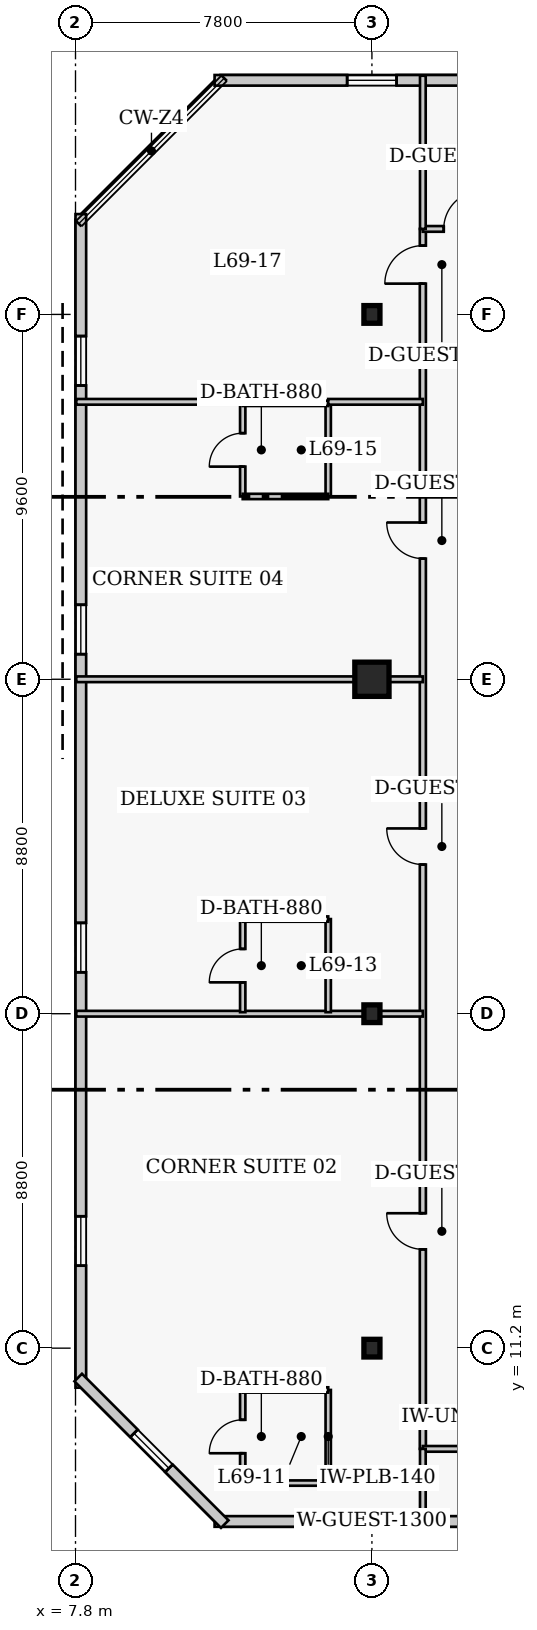
"""IFC4 building model, lengths in metres.
Left out: names, types, materials, properties, quantities, classifications, styles, units other than length and angle.
Written with IfcOpenShell. Run it as: python <this file> out.ifc"""

import sys

from ifc_helpers import new_model, si_unit, direction, frame, frame_2d, origin, origin_2d, place, context, subcontext, project, spatial, rectangle, i_section, extrude, element, fill, save


model = new_model("IFC4")
c1 = context("Model", 3, precision=1e-05, world=origin(), true_north=direction((0.0, 1.0)))
c2 = subcontext(c1, "Body", "Model", "MODEL_VIEW")
j1 = project(units=[si_unit("LENGTHUNIT", "METRE"), si_unit("PLANEANGLEUNIT", "RADIAN")], contexts=[c1])
p1 = place(None, origin())
s1 = spatial("IfcSite", under=j1, at=p1, CompositionType="ELEMENT")
p2 = place(p1, origin())
s2 = spatial("IfcBuilding", under=s1, at=p2, CompositionType="ELEMENT")
p3 = place(p2, frame((0.0, 0.0, 277.4)))
s3 = spatial("IfcBuildingStorey", under=s2, at=p3, CompositionType="ELEMENT", Elevation=277.4)
for number, where, z_axis, x_axis in (
    (1, (15.6, 11.2, 0.0), (0.0, 0.0, 1.0), (1.0, 0.0, 0.0)),
    (2, (15.6, 20.0, 0.0), (0.0, 0.0, 1.0), (1.0, 0.0, 0.0)),
):
    element("IfcColumn", number, at=place(p3, frame(where, z_axis=z_axis, x_axis=x_axis)), inside=s3, PredefinedType="COLUMN", context=c2, shape_type="SweptSolid", body=[
        extrude(i_section(OverallWidth=0.422, OverallDepth=0.465, WebThickness=0.045, FlangeThickness=0.073, FilletRadius=0.017, at=origin_2d()), origin(), (0.0, 0.0, 1.0), 4.0),
    ])
p4 = place(p3, frame((15.6, 28.8, 0.0), z_axis=(0.0, 0.0, 1.0), x_axis=(1.0, 0.0, 0.0)))
e3 = element("IfcColumn", 3, at=p4, inside=s3, PredefinedType="COLUMN", context=c2, shape_type="SweptSolid", body=[
    extrude(rectangle(XDim=0.9, YDim=0.9, at=origin_2d()), origin(), (0.0, 0.0, 1.0), 4.0),
])
p5 = place(p3, frame((15.6, 38.4, 0.0), z_axis=(0.0, 0.0, 1.0), x_axis=(1.0, 0.0, 0.0)))
e4 = element("IfcColumn", 4, at=p5, inside=s3, PredefinedType="COLUMN", context=c2, shape_type="SweptSolid", body=[
    extrude(i_section(OverallWidth=0.422, OverallDepth=0.465, WebThickness=0.045, FlangeThickness=0.073, FilletRadius=0.017, at=origin_2d()), origin(), (0.0, 0.0, 1.0), 4.0),
])
p6 = place(p3, frame((11.46, 6.64, 0.0), z_axis=(0.0, 0.0, 1.0), x_axis=(1.0, 0.0, 0.0)))
e5 = element("IfcWall", 5, at=p6, inside=s3, PredefinedType="SOLIDWALL", context=c2, shape_type="SweptSolid", body=[
    extrude(rectangle(XDim=24.83, YDim=0.28, at=frame_2d((12.415, 0.0))), origin(), (0.0, 0.0, 1.0), 3.76),
])
p7 = place(p6, frame((15.14, 0.0, 0.0)))
e6 = element("IfcOpeningElement", 6, at=p7, cuts=e5, PredefinedType="OPENING", context=c2, shape_type="SweptSolid", body=[
    extrude(rectangle(XDim=1.4, YDim=2.15, at=frame_2d((0.7, 1.075))), frame((0.0, 0.15, 0.0), z_axis=(0.0, -1.0, 0.0), x_axis=(1.0, 0.0, 0.0)), (0.0, 0.0, 1.0), 0.3),
])
p8 = place(p6, frame((3.488, 0.0, 0.85)))
e7 = element("IfcOpeningElement", 7, at=p8, cuts=e5, PredefinedType="OPENING", context=c2, shape_type="SweptSolid", body=[
    extrude(rectangle(XDim=1.3, YDim=1.7, at=frame_2d((0.65, 0.85))), frame((0.0, 0.15, 0.0), z_axis=(0.0, -1.0, 0.0), x_axis=(1.0, 0.0, 0.0)), (0.0, 0.0, 1.0), 0.3),
])
p9 = place(p6, frame((12.915, 0.0, 0.85)))
e8 = element("IfcOpeningElement", 8, at=p9, cuts=e5, PredefinedType="OPENING", context=c2, shape_type="SweptSolid", body=[
    extrude(rectangle(XDim=1.3, YDim=1.7, at=frame_2d((0.65, 0.85))), frame((0.0, 0.15, 0.0), z_axis=(0.0, -1.0, 0.0), x_axis=(1.0, 0.0, 0.0)), (0.0, 0.0, 1.0), 0.3),
])
p10 = place(p6, frame((20.692, 0.0, 0.85)))
e9 = element("IfcOpeningElement", 9, at=p10, cuts=e5, PredefinedType="OPENING", context=c2, shape_type="SweptSolid", body=[
    extrude(rectangle(XDim=1.3, YDim=1.7, at=frame_2d((0.65, 0.85))), frame((0.0, 0.15, 0.0), z_axis=(0.0, -1.0, 0.0), x_axis=(1.0, 0.0, 0.0)), (0.0, 0.0, 1.0), 0.3),
])
p11 = place(p3, frame((36.29, 44.56, 0.0), z_axis=(0.0, 0.0, 1.0), x_axis=(-1.0, 0.0, 0.0)))
e10 = element("IfcWall", 10, at=p11, inside=s3, PredefinedType="SOLIDWALL", context=c2, shape_type="SweptSolid", body=[
    extrude(rectangle(XDim=24.83, YDim=0.28, at=frame_2d((12.415, 0.0))), origin(), (0.0, 0.0, 1.0), 3.76),
])
p12 = place(p11, frame((3.488, 0.0, 0.85)))
e11 = element("IfcOpeningElement", 11, at=p12, cuts=e10, PredefinedType="OPENING", context=c2, shape_type="SweptSolid", body=[
    extrude(rectangle(XDim=1.3, YDim=1.7, at=frame_2d((0.65, 0.85))), frame((0.0, 0.15, 0.0), z_axis=(0.0, -1.0, 0.0), x_axis=(1.0, 0.0, 0.0)), (0.0, 0.0, 1.0), 0.3),
])
p13 = place(p11, frame((11.765, 0.0, 0.85)))
e12 = element("IfcOpeningElement", 12, at=p13, cuts=e10, PredefinedType="OPENING", context=c2, shape_type="SweptSolid", body=[
    extrude(rectangle(XDim=1.3, YDim=1.7, at=frame_2d((0.65, 0.85))), frame((0.0, 0.15, 0.0), z_axis=(0.0, -1.0, 0.0), x_axis=(1.0, 0.0, 0.0)), (0.0, 0.0, 1.0), 0.3),
])
p14 = place(p11, frame((20.042, 0.0, 0.85)))
e13 = element("IfcOpeningElement", 13, at=p14, cuts=e10, PredefinedType="OPENING", context=c2, shape_type="SweptSolid", body=[
    extrude(rectangle(XDim=1.3, YDim=1.7, at=frame_2d((0.65, 0.85))), frame((0.0, 0.15, 0.0), z_axis=(0.0, -1.0, 0.0), x_axis=(1.0, 0.0, 0.0)), (0.0, 0.0, 1.0), 0.3),
])
p15 = place(p3, frame((7.94, 41.04, 0.0), z_axis=(0.0, 0.0, 1.0), x_axis=(0.0, -1.0, 0.0)))
e14 = element("IfcWall", 14, at=p15, inside=s3, PredefinedType="SOLIDWALL", context=c2, shape_type="SweptSolid", body=[
    extrude(rectangle(XDim=30.88, YDim=0.28, at=frame_2d((15.44, 0.0))), origin(), (0.0, 0.0, 1.0), 3.76),
])
p16 = place(p15, frame((3.21, 0.0, 0.85)))
e15 = element("IfcOpeningElement", 15, at=p16, cuts=e14, PredefinedType="OPENING", context=c2, shape_type="SweptSolid", body=[
    extrude(rectangle(XDim=1.3, YDim=1.7, at=frame_2d((0.65, 0.85))), frame((0.0, 0.15, 0.0), z_axis=(0.0, -1.0, 0.0), x_axis=(1.0, 0.0, 0.0)), (0.0, 0.0, 1.0), 0.3),
])
p17 = place(p15, frame((10.28, 0.0, 0.85)))
e16 = element("IfcOpeningElement", 16, at=p17, cuts=e14, PredefinedType="OPENING", context=c2, shape_type="SweptSolid", body=[
    extrude(rectangle(XDim=1.3, YDim=1.7, at=frame_2d((0.65, 0.85))), frame((0.0, 0.15, 0.0), z_axis=(0.0, -1.0, 0.0), x_axis=(1.0, 0.0, 0.0)), (0.0, 0.0, 1.0), 0.3),
])
p18 = place(p15, frame((18.65, 0.0, 0.85)))
e17 = element("IfcOpeningElement", 17, at=p18, cuts=e14, PredefinedType="OPENING", context=c2, shape_type="SweptSolid", body=[
    extrude(rectangle(XDim=1.3, YDim=1.7, at=frame_2d((0.65, 0.85))), frame((0.0, 0.15, 0.0), z_axis=(0.0, -1.0, 0.0), x_axis=(1.0, 0.0, 0.0)), (0.0, 0.0, 1.0), 0.3),
])
p19 = place(p15, frame((26.37, 0.0, 0.85)))
e18 = element("IfcOpeningElement", 18, at=p19, cuts=e14, PredefinedType="OPENING", context=c2, shape_type="SweptSolid", body=[
    extrude(rectangle(XDim=1.3, YDim=1.7, at=frame_2d((0.65, 0.85))), frame((0.0, 0.15, 0.0), z_axis=(0.0, -1.0, 0.0), x_axis=(1.0, 0.0, 0.0)), (0.0, 0.0, 1.0), 0.3),
])
p20 = place(p3, frame((7.871, 10.427, 0.0), z_axis=(0.0, 0.0, 1.0), x_axis=(0.707129162587, -0.707084399077, 0.0)))
e19 = element("IfcWall", 19, at=p20, inside=s3, PredefinedType="SOLIDWALL", context=c2, shape_type="SweptSolid", body=[
    extrude(rectangle(XDim=5.454, YDim=0.28, at=frame_2d((2.727, 0.0))), origin(), (0.0, 0.0, 1.0), 3.76),
])
p21 = place(p20, frame((2.077, 0.0, 0.85)))
e20 = element("IfcOpeningElement", 20, at=p21, cuts=e19, PredefinedType="OPENING", context=c2, shape_type="SweptSolid", body=[
    extrude(rectangle(XDim=1.3, YDim=1.7, at=frame_2d((0.65, 0.85))), frame((0.0, 0.15, 0.0), z_axis=(0.0, -1.0, 0.0), x_axis=(1.0, 0.0, 0.0)), (0.0, 0.0, 1.0), 0.3),
])
p22 = place(p3, frame((16.94, 8.55, 0.0), z_axis=(0.0, 0.0, 1.0), x_axis=(0.0, 1.0, 0.0)))
e21 = element("IfcWall", 21, at=p22, inside=s3, PredefinedType="PARTITIONING", context=c2, shape_type="SweptSolid", body=[
    extrude(rectangle(XDim=32.1, YDim=0.16, at=frame_2d((16.05, 0.0))), origin(), (0.0, 0.0, 1.0), 3.76),
])
p23 = place(p22, frame((5.25, 0.0, 0.0)))
e22 = element("IfcOpeningElement", 22, at=p23, cuts=e21, PredefinedType="OPENING", context=c2, shape_type="SweptSolid", body=[
    extrude(rectangle(XDim=0.95, YDim=2.1, at=frame_2d((0.475, 1.05))), frame((0.0, 0.09, 0.0), z_axis=(0.0, -1.0, 0.0), x_axis=(1.0, 0.0, 0.0)), (0.0, 0.0, 1.0), 0.18),
])
p24 = place(p22, frame((15.375, 0.0, 0.0)))
e23 = element("IfcOpeningElement", 23, at=p24, cuts=e21, PredefinedType="OPENING", context=c2, shape_type="SweptSolid", body=[
    extrude(rectangle(XDim=0.95, YDim=2.1, at=frame_2d((0.475, 1.05))), frame((0.0, 0.09, 0.0), z_axis=(0.0, -1.0, 0.0), x_axis=(1.0, 0.0, 0.0)), (0.0, 0.0, 1.0), 0.18),
])
p25 = place(p22, frame((23.425, 0.0, 0.0)))
e24 = element("IfcOpeningElement", 24, at=p25, cuts=e21, PredefinedType="OPENING", context=c2, shape_type="SweptSolid", body=[
    extrude(rectangle(XDim=0.95, YDim=2.1, at=frame_2d((0.475, 1.05))), frame((0.0, 0.09, 0.0), z_axis=(0.0, -1.0, 0.0), x_axis=(1.0, 0.0, 0.0)), (0.0, 0.0, 1.0), 0.18),
])
p26 = place(p22, frame((30.66, 0.0, 0.0)))
e25 = element("IfcOpeningElement", 25, at=p26, cuts=e21, PredefinedType="OPENING", context=c2, shape_type="SweptSolid", body=[
    extrude(rectangle(XDim=1.0, YDim=2.15, at=frame_2d((0.5, 1.075))), frame((0.0, 0.09, 0.0), z_axis=(0.0, -1.0, 0.0), x_axis=(1.0, 0.0, 0.0)), (0.0, 0.0, 1.0), 0.18),
])
p27 = place(p3, frame((16.94, 8.55, 0.0), z_axis=(0.0, 0.0, 1.0), x_axis=(1.0, 0.0, 0.0)))
e26 = element("IfcWall", 26, at=p27, inside=s3, PredefinedType="PARTITIONING", context=c2, shape_type="SweptSolid", body=[
    extrude(rectangle(XDim=2.22, YDim=0.15, at=frame_2d((1.11, 0.0))), origin(), (0.0, 0.0, 1.0), 3.76),
])
p28 = place(p3, frame((16.94, 40.65, 0.0), z_axis=(0.0, 0.0, 1.0), x_axis=(1.0, 0.0, 0.0)))
e27 = element("IfcWall", 27, at=p28, inside=s3, PredefinedType="PARTITIONING", context=c2, shape_type="SweptSolid", body=[
    extrude(rectangle(XDim=5.16, YDim=0.15, at=frame_2d((2.58, 0.0))), origin(), (0.0, 0.0, 1.0), 3.76),
])
p29 = place(p28, frame((0.55, 0.0, 0.0)))
e28 = element("IfcOpeningElement", 28, at=p29, cuts=e27, PredefinedType="OPENING", context=c2, shape_type="SweptSolid", body=[
    extrude(rectangle(XDim=1.0, YDim=2.15, at=frame_2d((0.5, 1.075))), frame((0.0, 0.085, 0.0), z_axis=(0.0, -1.0, 0.0), x_axis=(1.0, 0.0, 0.0)), (0.0, 0.0, 1.0), 0.17),
])
p30 = place(p3, frame((16.94, 40.65, 0.0), z_axis=(0.0, 0.0, 1.0), x_axis=(0.0, 1.0, 0.0)))
e29 = element("IfcWall", 29, at=p30, inside=s3, PredefinedType="PARTITIONING", context=c2, shape_type="SweptSolid", body=[
    extrude(rectangle(XDim=4.03, YDim=0.15, at=frame_2d((2.015, 0.0))), origin(), (0.0, 0.0, 1.0), 3.76),
])
p31 = place(p3, frame((16.94, 6.52, 0.0), z_axis=(0.0, 0.0, 1.0), x_axis=(0.0, 1.0, 0.0)))
e30 = element("IfcWall", 30, at=p31, inside=s3, PredefinedType="PARTITIONING", context=c2, shape_type="SweptSolid", body=[
    extrude(rectangle(XDim=2.03, YDim=0.15, at=frame_2d((1.015, 0.0))), origin(), (0.0, 0.0, 1.0), 3.76),
])
p32 = place(p3, frame((12.2, 7.65, 0.0), z_axis=(0.0, 0.0, 1.0), x_axis=(0.0, 1.0, 0.0)))
e31 = element("IfcWall", 31, at=p32, inside=s3, PredefinedType="PLUMBINGWALL", context=c2, shape_type="SweptSolid", body=[
    extrude(rectangle(XDim=2.45, YDim=0.14, at=frame_2d((1.225, 0.0))), origin(), (0.0, 0.0, 1.0), 3.76),
])
p33 = place(p32, frame((0.785, 0.0, 0.0)))
e32 = element("IfcOpeningElement", 32, at=p33, cuts=e31, PredefinedType="OPENING", context=c2, shape_type="SweptSolid", body=[
    extrude(rectangle(XDim=0.88, YDim=2.05, at=frame_2d((0.44, 1.025))), frame((0.0, 0.08, 0.0), z_axis=(0.0, -1.0, 0.0), x_axis=(1.0, 0.0, 0.0)), (0.0, 0.0, 1.0), 0.16),
])
p34 = place(p3, frame((14.45, 7.65, 0.0), z_axis=(0.0, 0.0, 1.0), x_axis=(0.0, 1.0, 0.0)))
e33 = element("IfcWall", 33, at=p34, inside=s3, PredefinedType="PLUMBINGWALL", context=c2, shape_type="SweptSolid", body=[
    extrude(rectangle(XDim=2.45, YDim=0.14, at=frame_2d((1.225, 0.0))), origin(), (0.0, 0.0, 1.0), 3.76),
])
for number, where, z_axis, x_axis in (
    (34, (12.2, 7.65, 0.0), (0.0, 0.0, 1.0), (1.0, 0.0, 0.0)),
    (35, (12.2, 10.1, 0.0), (0.0, 0.0, 1.0), (1.0, 0.0, 0.0)),
):
    element("IfcWall", number, at=place(p3, frame(where, z_axis=z_axis, x_axis=x_axis)), inside=s3, PredefinedType="PLUMBINGWALL", context=c2, shape_type="SweptSolid", body=[
        extrude(rectangle(XDim=2.25, YDim=0.14, at=frame_2d((1.125, 0.0))), origin(), (0.0, 0.0, 1.0), 3.76),
    ])
p35 = place(p3, frame((7.82, 20.0, 0.0), z_axis=(0.0, 0.0, 1.0), x_axis=(1.0, 0.0, 0.0)))
e36 = element("IfcWall", 36, at=p35, inside=s3, PredefinedType="PARTITIONING", context=c2, shape_type="SweptSolid", body=[
    extrude(rectangle(XDim=9.12, YDim=0.15, at=frame_2d((4.56, 0.0))), origin(), (0.0, 0.0, 1.0), 3.064),
])
p36 = place(p3, frame((12.2, 20.04, 0.0), z_axis=(0.0, 0.0, 1.0), x_axis=(0.0, 1.0, 0.0)))
e37 = element("IfcWall", 37, at=p36, inside=s3, PredefinedType="PLUMBINGWALL", context=c2, shape_type="SweptSolid", body=[
    extrude(rectangle(XDim=2.45, YDim=0.14, at=frame_2d((1.225, 0.0))), origin(), (0.0, 0.0, 1.0), 3.76),
])
p37 = place(p36, frame((0.785, 0.0, 0.0)))
e38 = element("IfcOpeningElement", 38, at=p37, cuts=e37, PredefinedType="OPENING", context=c2, shape_type="SweptSolid", body=[
    extrude(rectangle(XDim=0.88, YDim=2.05, at=frame_2d((0.44, 1.025))), frame((0.0, 0.08, 0.0), z_axis=(0.0, -1.0, 0.0), x_axis=(1.0, 0.0, 0.0)), (0.0, 0.0, 1.0), 0.16),
])
p38 = place(p3, frame((14.45, 20.04, 0.0), z_axis=(0.0, 0.0, 1.0), x_axis=(0.0, 1.0, 0.0)))
e39 = element("IfcWall", 39, at=p38, inside=s3, PredefinedType="PLUMBINGWALL", context=c2, shape_type="SweptSolid", body=[
    extrude(rectangle(XDim=2.45, YDim=0.14, at=frame_2d((1.225, 0.0))), origin(), (0.0, 0.0, 1.0), 3.76),
])
p39 = place(p3, frame((12.2, 22.49, 0.0), z_axis=(0.0, 0.0, 1.0), x_axis=(1.0, 0.0, 0.0)))
e40 = element("IfcWall", 40, at=p39, inside=s3, PredefinedType="PLUMBINGWALL", context=c2, shape_type="SweptSolid", body=[
    extrude(rectangle(XDim=2.25, YDim=0.14, at=frame_2d((1.125, 0.0))), origin(), (0.0, 0.0, 1.0), 3.76),
])
p40 = place(p3, frame((7.82, 28.8, 0.0), z_axis=(0.0, 0.0, 1.0), x_axis=(1.0, 0.0, 0.0)))
e41 = element("IfcWall", 41, at=p40, inside=s3, PredefinedType="PARTITIONING", context=c2, shape_type="SweptSolid", body=[
    extrude(rectangle(XDim=9.12, YDim=0.15, at=frame_2d((4.56, 0.0))), origin(), (0.0, 0.0, 1.0), 3.064),
])
p41 = place(p3, frame((12.2, 33.61, 0.0), z_axis=(0.0, 0.0, 1.0), x_axis=(0.0, 1.0, 0.0)))
e42 = element("IfcWall", 42, at=p41, inside=s3, PredefinedType="PLUMBINGWALL", context=c2, shape_type="SweptSolid", body=[
    extrude(rectangle(XDim=2.45, YDim=0.14, at=frame_2d((1.225, 0.0))), origin(), (0.0, 0.0, 1.0), 3.76),
])
p42 = place(p41, frame((0.785, 0.0, 0.0)))
e43 = element("IfcOpeningElement", 43, at=p42, cuts=e42, PredefinedType="OPENING", context=c2, shape_type="SweptSolid", body=[
    extrude(rectangle(XDim=0.88, YDim=2.05, at=frame_2d((0.44, 1.025))), frame((0.0, 0.08, 0.0), z_axis=(0.0, -1.0, 0.0), x_axis=(1.0, 0.0, 0.0)), (0.0, 0.0, 1.0), 0.16),
])
p43 = place(p3, frame((14.45, 33.61, 0.0), z_axis=(0.0, 0.0, 1.0), x_axis=(0.0, 1.0, 0.0)))
e44 = element("IfcWall", 44, at=p43, inside=s3, PredefinedType="PLUMBINGWALL", context=c2, shape_type="SweptSolid", body=[
    extrude(rectangle(XDim=2.45, YDim=0.14, at=frame_2d((1.225, 0.0))), origin(), (0.0, 0.0, 1.0), 3.76),
])
for number, where, z_axis, x_axis in (
    (45, (12.2, 33.61, 0.0), (0.0, 0.0, 1.0), (1.0, 0.0, 0.0)),
    (46, (12.2, 36.06, 0.0), (0.0, 0.0, 1.0), (1.0, 0.0, 0.0)),
):
    element("IfcWall", number, at=place(p3, frame(where, z_axis=z_axis, x_axis=x_axis)), inside=s3, PredefinedType="PLUMBINGWALL", context=c2, shape_type="SweptSolid", body=[
        extrude(rectangle(XDim=2.25, YDim=0.14, at=frame_2d((1.125, 0.0))), origin(), (0.0, 0.0, 1.0), 3.76),
    ])
p44 = place(p3, frame((7.82, 36.1, 0.0), z_axis=(0.0, 0.0, 1.0), x_axis=(1.0, 0.0, 0.0)))
e47 = element("IfcWall", 47, at=p44, inside=s3, PredefinedType="PARTITIONING", context=c2, shape_type="SweptSolid", body=[
    extrude(rectangle(XDim=4.38, YDim=0.15, at=frame_2d((2.19, 0.0))), origin(), (0.0, 0.0, 1.0), 3.76),
])
p45 = place(p3, frame((14.45, 36.1, 0.0), z_axis=(0.0, 0.0, 1.0), x_axis=(1.0, 0.0, 0.0)))
e48 = element("IfcWall", 48, at=p45, inside=s3, PredefinedType="PARTITIONING", context=c2, shape_type="SweptSolid", body=[
    extrude(rectangle(XDim=2.49, YDim=0.15, at=frame_2d((1.245, 0.0))), origin(), (0.0, 0.0, 1.0), 3.76),
])
p46 = place(p8, origin())
e49 = element("IfcWindow", 49, at=p46, inside=s3, PartitioningType="SINGLE_PANEL", PredefinedType="WINDOW", context=c2, shape_type="SweptSolid", body=[
    extrude(rectangle(XDim=1.3, YDim=1.7, at=frame_2d((0.65, 0.85))), frame((0.0, 0.03, 0.0), z_axis=(0.0, -1.0, 0.0), x_axis=(1.0, 0.0, 0.0)), (0.0, 0.0, 1.0), 0.06),
])
fill(e7, e49)
p47 = place(p14, origin())
e50 = element("IfcWindow", 50, at=p47, inside=s3, PartitioningType="SINGLE_PANEL", PredefinedType="WINDOW", context=c2, shape_type="SweptSolid", body=[
    extrude(rectangle(XDim=1.3, YDim=1.7, at=frame_2d((0.65, 0.85))), frame((0.0, 0.03, 0.0), z_axis=(0.0, -1.0, 0.0), x_axis=(1.0, 0.0, 0.0)), (0.0, 0.0, 1.0), 0.06),
])
fill(e13, e50)
p48 = place(p16, origin())
e51 = element("IfcWindow", 51, at=p48, inside=s3, PartitioningType="SINGLE_PANEL", PredefinedType="WINDOW", context=c2, shape_type="SweptSolid", body=[
    extrude(rectangle(XDim=1.3, YDim=1.7, at=frame_2d((0.65, 0.85))), frame((0.0, 0.03, 0.0), z_axis=(0.0, -1.0, 0.0), x_axis=(1.0, 0.0, 0.0)), (0.0, 0.0, 1.0), 0.06),
])
fill(e15, e51)
p49 = place(p17, origin())
e52 = element("IfcWindow", 52, at=p49, inside=s3, PartitioningType="SINGLE_PANEL", PredefinedType="WINDOW", context=c2, shape_type="SweptSolid", body=[
    extrude(rectangle(XDim=1.3, YDim=1.7, at=frame_2d((0.65, 0.85))), frame((0.0, 0.03, 0.0), z_axis=(0.0, -1.0, 0.0), x_axis=(1.0, 0.0, 0.0)), (0.0, 0.0, 1.0), 0.06),
])
fill(e16, e52)
p50 = place(p18, origin())
e53 = element("IfcWindow", 53, at=p50, inside=s3, PartitioningType="SINGLE_PANEL", PredefinedType="WINDOW", context=c2, shape_type="SweptSolid", body=[
    extrude(rectangle(XDim=1.3, YDim=1.7, at=frame_2d((0.65, 0.85))), frame((0.0, 0.03, 0.0), z_axis=(0.0, -1.0, 0.0), x_axis=(1.0, 0.0, 0.0)), (0.0, 0.0, 1.0), 0.06),
])
fill(e17, e53)
p51 = place(p19, origin())
e54 = element("IfcWindow", 54, at=p51, inside=s3, PartitioningType="SINGLE_PANEL", PredefinedType="WINDOW", context=c2, shape_type="SweptSolid", body=[
    extrude(rectangle(XDim=1.3, YDim=1.7, at=frame_2d((0.65, 0.85))), frame((0.0, 0.03, 0.0), z_axis=(0.0, -1.0, 0.0), x_axis=(1.0, 0.0, 0.0)), (0.0, 0.0, 1.0), 0.06),
])
fill(e18, e54)
p52 = place(p21, origin())
e55 = element("IfcWindow", 55, at=p52, inside=s3, PartitioningType="SINGLE_PANEL", PredefinedType="WINDOW", context=c2, shape_type="SweptSolid", body=[
    extrude(rectangle(XDim=1.3, YDim=1.7, at=frame_2d((0.65, 0.85))), frame((0.0, 0.03, 0.0), z_axis=(0.0, -1.0, 0.0), x_axis=(1.0, 0.0, 0.0)), (0.0, 0.0, 1.0), 0.06),
])
fill(e20, e55)
p53 = place(p29, origin())
e56 = element("IfcDoor", 56, at=p53, inside=s3, OperationType="SINGLE_SWING_RIGHT", PredefinedType="DOOR", context=c2, shape_type="SweptSolid", body=[
    extrude(rectangle(XDim=1.0, YDim=2.15, at=frame_2d((0.5, 1.075))), frame((0.0, 0.025, 0.0), z_axis=(0.0, -1.0, 0.0), x_axis=(1.0, 0.0, 0.0)), (0.0, 0.0, 1.0), 0.05),
])
fill(e28, e56)
p54 = place(p33, origin())
e57 = element("IfcDoor", 57, at=p54, inside=s3, OperationType="SINGLE_SWING_LEFT", PredefinedType="DOOR", context=c2, shape_type="SweptSolid", body=[
    extrude(rectangle(XDim=0.88, YDim=2.05, at=frame_2d((0.44, 1.025))), frame((0.0, 0.025, 0.0), z_axis=(0.0, -1.0, 0.0), x_axis=(1.0, 0.0, 0.0)), (0.0, 0.0, 1.0), 0.05),
])
fill(e32, e57)
p55 = place(p23, origin())
e58 = element("IfcDoor", 58, at=p55, inside=s3, OperationType="SINGLE_SWING_RIGHT", PredefinedType="DOOR", context=c2, shape_type="SweptSolid", body=[
    extrude(rectangle(XDim=0.95, YDim=2.1, at=frame_2d((0.475, 1.05))), frame((0.0, 0.025, 0.0), z_axis=(0.0, -1.0, 0.0), x_axis=(1.0, 0.0, 0.0)), (0.0, 0.0, 1.0), 0.05),
])
fill(e22, e58)
p56 = place(p37, origin())
e59 = element("IfcDoor", 59, at=p56, inside=s3, OperationType="SINGLE_SWING_LEFT", PredefinedType="DOOR", context=c2, shape_type="SweptSolid", body=[
    extrude(rectangle(XDim=0.88, YDim=2.05, at=frame_2d((0.44, 1.025))), frame((0.0, 0.025, 0.0), z_axis=(0.0, -1.0, 0.0), x_axis=(1.0, 0.0, 0.0)), (0.0, 0.0, 1.0), 0.05),
])
fill(e38, e59)
p57 = place(p24, origin())
e60 = element("IfcDoor", 60, at=p57, inside=s3, OperationType="SINGLE_SWING_RIGHT", PredefinedType="DOOR", context=c2, shape_type="SweptSolid", body=[
    extrude(rectangle(XDim=0.95, YDim=2.1, at=frame_2d((0.475, 1.05))), frame((0.0, 0.025, 0.0), z_axis=(0.0, -1.0, 0.0), x_axis=(1.0, 0.0, 0.0)), (0.0, 0.0, 1.0), 0.05),
])
fill(e23, e60)
p58 = place(p42, origin())
e61 = element("IfcDoor", 61, at=p58, inside=s3, OperationType="SINGLE_SWING_LEFT", PredefinedType="DOOR", context=c2, shape_type="SweptSolid", body=[
    extrude(rectangle(XDim=0.88, YDim=2.05, at=frame_2d((0.44, 1.025))), frame((0.0, 0.025, 0.0), z_axis=(0.0, -1.0, 0.0), x_axis=(1.0, 0.0, 0.0)), (0.0, 0.0, 1.0), 0.05),
])
fill(e43, e61)
p59 = place(p25, origin())
e62 = element("IfcDoor", 62, at=p59, inside=s3, OperationType="SINGLE_SWING_RIGHT", PredefinedType="DOOR", context=c2, shape_type="SweptSolid", body=[
    extrude(rectangle(XDim=0.95, YDim=2.1, at=frame_2d((0.475, 1.05))), frame((0.0, 0.025, 0.0), z_axis=(0.0, -1.0, 0.0), x_axis=(1.0, 0.0, 0.0)), (0.0, 0.0, 1.0), 0.05),
])
fill(e24, e62)
p60 = place(p26, origin())
e63 = element("IfcDoor", 63, at=p60, inside=s3, OperationType="SINGLE_SWING_LEFT", PredefinedType="DOOR", context=c2, shape_type="SweptSolid", body=[
    extrude(rectangle(XDim=1.0, YDim=2.15, at=frame_2d((0.5, 1.075))), frame((0.0, 0.025, 0.0), z_axis=(0.0, -1.0, 0.0), x_axis=(1.0, 0.0, 0.0)), (0.0, 0.0, 1.0), 0.05),
])
fill(e25, e63)
save(model, sys.argv[1])
